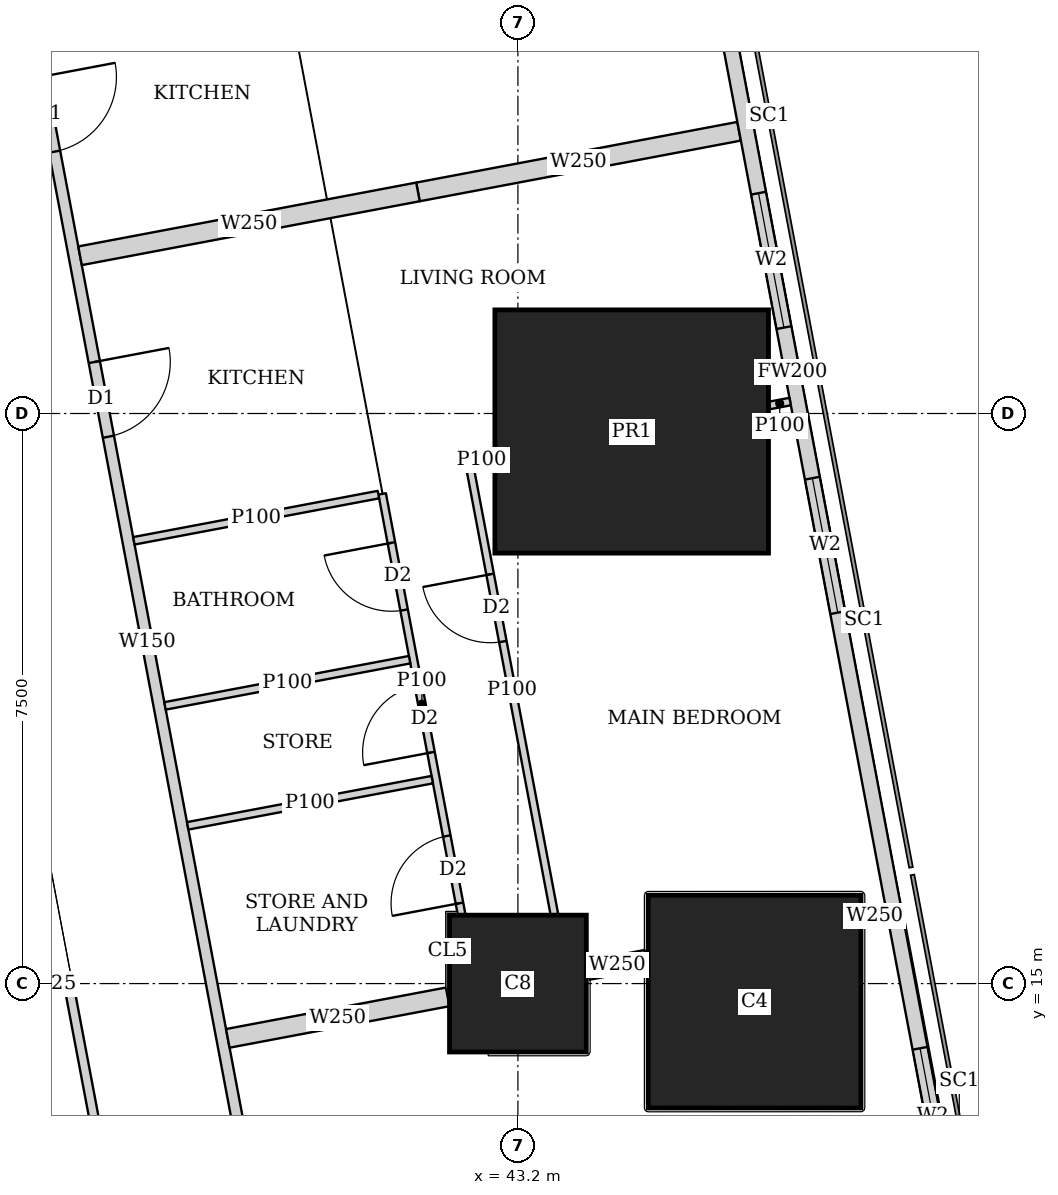
"""IFC4 building model, lengths in metres.
Left out: names, types, materials, properties, quantities, classifications, styles, units other than length and angle.
Written with IfcOpenShell. Run it as: python <this file> out.ifc"""

import sys

from ifc_helpers import new_model, si_unit, direction, frame, frame_2d, origin, origin_2d, place, context, subcontext, project, spatial, rectangle, extrude, element, fill, save


model = new_model("IFC4")
c1 = context("Model", 3, precision=1e-05, world=origin(), true_north=direction((0.0, 1.0)))
c2 = subcontext(c1, "Body", "Model", "MODEL_VIEW")
j1 = project(units=[si_unit("LENGTHUNIT", "METRE"), si_unit("PLANEANGLEUNIT", "RADIAN")], contexts=[c1])
p1 = place(None, origin())
s1 = spatial("IfcSite", under=j1, at=p1, CompositionType="ELEMENT")
p2 = place(p1, origin())
s2 = spatial("IfcBuilding", under=s1, at=p2, CompositionType="ELEMENT")
p3 = place(p2, frame((0.0, 0.0, 53.75)))
s3 = spatial("IfcBuildingStorey", under=s2, at=p3, CompositionType="ELEMENT", Elevation=53.75)
p4 = place(p3, frame((43.2, 15.0, 0.0), z_axis=(0.0, 0.0, 1.0), x_axis=(1.0, 0.0, 0.0)))
e1 = element("IfcColumn", 1, at=p4, inside=s3, PredefinedType="COLUMN", context=c2, shape_type="SweptSolid", body=[
    extrude(rectangle(XDim=1.8, YDim=1.8, at=origin_2d()), origin(), (0.0, 0.0, 1.0), 3.75),
])
p5 = place(p3, frame((46.314, 14.763, 0.0), z_axis=(0.0, 0.0, 1.0), x_axis=(1.0, 0.0, 0.0)))
e2 = element("IfcColumn", 2, at=p5, inside=s3, PredefinedType="COLUMN", context=c2, shape_type="SweptSolid", body=[
    extrude(rectangle(XDim=2.8, YDim=2.8, at=origin_2d()), origin(), (0.0, 0.0, 1.0), 3.75),
])
p6 = place(p3, frame((44.697, 22.263, 0.0), z_axis=(0.0, 0.0, 1.0), x_axis=(1.0, 0.0, 0.0)))
e3 = element("IfcColumn", 3, at=p6, inside=s3, PredefinedType="COLUMN", context=c2, shape_type="SweptSolid", body=[
    extrude(rectangle(XDim=3.6, YDim=3.2, at=origin_2d()), origin(), (0.0, 0.0, 1.0), 3.75),
])
p7 = place(p3, frame((50.653, 2.703, 0.0), z_axis=(0.0, 0.0, 1.0), x_axis=(-0.185612026696, 0.982623109613, 0.0)))
e4 = element("IfcWall", 4, at=p7, inside=s3, PredefinedType="SOLIDWALL", context=c2, shape_type="SweptSolid", body=[
    extrude(rectangle(XDim=41.393, YDim=0.2, at=frame_2d((20.697, 0.0))), origin(), (0.0, 0.0, 1.0), 3.5),
])
p8 = place(p7, frame((1.633, 0.0, 0.9)))
e5 = element("IfcOpeningElement", 5, at=p8, cuts=e4, PredefinedType="OPENING", context=c2, shape_type="SweptSolid", body=[
    extrude(rectangle(XDim=1.8, YDim=1.5, at=frame_2d((0.9, 0.75))), frame((0.0, 0.11, 0.0), z_axis=(0.0, -1.0, 0.0), x_axis=(1.0, 0.0, 0.0)), (0.0, 0.0, 1.0), 0.22),
])
p9 = place(p7, frame((6.032, 0.0, 0.9)))
e6 = element("IfcOpeningElement", 6, at=p9, cuts=e4, PredefinedType="OPENING", context=c2, shape_type="SweptSolid", body=[
    extrude(rectangle(XDim=1.8, YDim=1.5, at=frame_2d((0.9, 0.75))), frame((0.0, 0.11, 0.0), z_axis=(0.0, -1.0, 0.0), x_axis=(1.0, 0.0, 0.0)), (0.0, 0.0, 1.0), 0.22),
])
p10 = place(p7, frame((9.848, 0.0, 0.9)))
e7 = element("IfcOpeningElement", 7, at=p10, cuts=e4, PredefinedType="OPENING", context=c2, shape_type="SweptSolid", body=[
    extrude(rectangle(XDim=1.8, YDim=1.5, at=frame_2d((0.9, 0.75))), frame((0.0, 0.11, 0.0), z_axis=(0.0, -1.0, 0.0), x_axis=(1.0, 0.0, 0.0)), (0.0, 0.0, 1.0), 0.22),
])
p11 = place(p7, frame((17.481, 0.0, 0.9)))
e8 = element("IfcOpeningElement", 8, at=p11, cuts=e4, PredefinedType="OPENING", context=c2, shape_type="SweptSolid", body=[
    extrude(rectangle(XDim=1.8, YDim=1.5, at=frame_2d((0.9, 0.75))), frame((0.0, 0.11, 0.0), z_axis=(0.0, -1.0, 0.0), x_axis=(1.0, 0.0, 0.0)), (0.0, 0.0, 1.0), 0.22),
])
p12 = place(p7, frame((21.297, 0.0, 0.9)))
e9 = element("IfcOpeningElement", 9, at=p12, cuts=e4, PredefinedType="OPENING", context=c2, shape_type="SweptSolid", body=[
    extrude(rectangle(XDim=1.8, YDim=1.5, at=frame_2d((0.9, 0.75))), frame((0.0, 0.11, 0.0), z_axis=(0.0, -1.0, 0.0), x_axis=(1.0, 0.0, 0.0)), (0.0, 0.0, 1.0), 0.22),
])
p13 = place(p7, frame((25.113, 0.0, 0.9)))
e10 = element("IfcOpeningElement", 10, at=p13, cuts=e4, PredefinedType="OPENING", context=c2, shape_type="SweptSolid", body=[
    extrude(rectangle(XDim=1.8, YDim=1.5, at=frame_2d((0.9, 0.75))), frame((0.0, 0.11, 0.0), z_axis=(0.0, -1.0, 0.0), x_axis=(1.0, 0.0, 0.0)), (0.0, 0.0, 1.0), 0.22),
])
p14 = place(p7, frame((28.93, 0.0, 0.9)))
e11 = element("IfcOpeningElement", 11, at=p14, cuts=e4, PredefinedType="OPENING", context=c2, shape_type="SweptSolid", body=[
    extrude(rectangle(XDim=1.8, YDim=1.5, at=frame_2d((0.9, 0.75))), frame((0.0, 0.11, 0.0), z_axis=(0.0, -1.0, 0.0), x_axis=(1.0, 0.0, 0.0)), (0.0, 0.0, 1.0), 0.22),
])
p15 = place(p7, frame((32.746, 0.0, 0.9)))
e12 = element("IfcOpeningElement", 12, at=p15, cuts=e4, PredefinedType="OPENING", context=c2, shape_type="SweptSolid", body=[
    extrude(rectangle(XDim=1.8, YDim=1.5, at=frame_2d((0.9, 0.75))), frame((0.0, 0.11, 0.0), z_axis=(0.0, -1.0, 0.0), x_axis=(1.0, 0.0, 0.0)), (0.0, 0.0, 1.0), 0.22),
])
p16 = place(p7, frame((36.481, 0.0, 0.9)))
e13 = element("IfcOpeningElement", 13, at=p16, cuts=e4, PredefinedType="OPENING", context=c2, shape_type="SweptSolid", body=[
    extrude(rectangle(XDim=1.8, YDim=1.5, at=frame_2d((0.9, 0.75))), frame((0.0, 0.11, 0.0), z_axis=(0.0, -1.0, 0.0), x_axis=(1.0, 0.0, 0.0)), (0.0, 0.0, 1.0), 0.22),
])
p17 = place(p3, frame((35.094, 36.585, 0.0), z_axis=(0.0, 0.0, 1.0), x_axis=(0.185588860311, -0.982627485331, 0.0)))
e14 = element("IfcWall", 14, at=p17, inside=s3, PredefinedType="SOLIDWALL", context=c2, shape_type="SweptSolid", body=[
    extrude(rectangle(XDim=34.797, YDim=0.15, at=frame_2d((17.399, 0.0))), origin(), (0.0, 0.0, 1.0), 2.5),
])
p18 = place(p17, frame((9.828, 0.0, 0.0)))
e15 = element("IfcOpeningElement", 15, at=p18, cuts=e14, PredefinedType="OPENING", context=c2, shape_type="SweptSolid", body=[
    extrude(rectangle(XDim=1.0, YDim=2.1, at=frame_2d((0.5, 1.05))), frame((0.0, 0.085, 0.0), z_axis=(0.0, -1.0, 0.0), x_axis=(1.0, 0.0, 0.0)), (0.0, 0.0, 1.0), 0.17),
])
p19 = place(p17, frame((13.645, 0.0, 0.0)))
e16 = element("IfcOpeningElement", 16, at=p19, cuts=e14, PredefinedType="OPENING", context=c2, shape_type="SweptSolid", body=[
    extrude(rectangle(XDim=1.0, YDim=2.1, at=frame_2d((0.5, 1.05))), frame((0.0, 0.085, 0.0), z_axis=(0.0, -1.0, 0.0), x_axis=(1.0, 0.0, 0.0)), (0.0, 0.0, 1.0), 0.17),
])
p20 = place(p17, frame((25.9, 0.0, 0.0)))
e17 = element("IfcOpeningElement", 17, at=p20, cuts=e14, PredefinedType="OPENING", context=c2, shape_type="SweptSolid", body=[
    extrude(rectangle(XDim=1.0, YDim=2.1, at=frame_2d((0.5, 1.05))), frame((0.0, 0.085, 0.0), z_axis=(0.0, -1.0, 0.0), x_axis=(1.0, 0.0, 0.0)), (0.0, 0.0, 1.0), 0.17),
])
p21 = place(p3, frame((42.565, 21.809, 0.0), z_axis=(0.0, 0.0, 1.0), x_axis=(0.185719768524, -0.982602751665, 0.0)))
e18 = element("IfcWall", 18, at=p21, inside=s3, PredefinedType="PARTITIONING", context=c2, shape_type="SweptSolid", body=[
    extrude(rectangle(XDim=6.004, YDim=0.1, at=frame_2d((3.002, 0.0))), origin(), (0.0, 0.0, 1.0), 2.5),
])
p22 = place(p21, frame((1.45, 0.0, 0.0)))
e19 = element("IfcOpeningElement", 19, at=p22, cuts=e18, PredefinedType="OPENING", context=c2, shape_type="SweptSolid", body=[
    extrude(rectangle(XDim=0.9, YDim=2.1, at=frame_2d((0.45, 1.05))), frame((0.0, 0.06, 0.0), z_axis=(0.0, -1.0, 0.0), x_axis=(1.0, 0.0, 0.0)), (0.0, 0.0, 1.0), 0.12),
])
p23 = place(p3, frame((41.414, 21.442, 0.0), z_axis=(0.0, 0.0, 1.0), x_axis=(0.185605379031, -0.982624365297, 0.0)))
e20 = element("IfcWall", 20, at=p23, inside=s3, PredefinedType="PARTITIONING", context=c2, shape_type="SweptSolid", body=[
    extrude(rectangle(XDim=5.63, YDim=0.1, at=frame_2d((2.815, 0.0))), origin(), (0.0, 0.0, 1.0), 3.5),
])
p24 = place(p23, frame((0.655, 0.0, 0.0)))
e21 = element("IfcOpeningElement", 21, at=p24, cuts=e20, PredefinedType="OPENING", context=c2, shape_type="SweptSolid", body=[
    extrude(rectangle(XDim=0.9, YDim=2.1, at=frame_2d((0.45, 1.05))), frame((0.0, 0.06, 0.0), z_axis=(0.0, -1.0, 0.0), x_axis=(1.0, 0.0, 0.0)), (0.0, 0.0, 1.0), 0.12),
])
p25 = place(p23, frame((4.58, 0.0, 0.0)))
e22 = element("IfcOpeningElement", 22, at=p25, cuts=e20, PredefinedType="OPENING", context=c2, shape_type="SweptSolid", body=[
    extrude(rectangle(XDim=0.9, YDim=2.1, at=frame_2d((0.45, 1.05))), frame((0.0, 0.06, 0.0), z_axis=(0.0, -1.0, 0.0), x_axis=(1.0, 0.0, 0.0)), (0.0, 0.0, 1.0), 0.12),
])
p26 = place(p23, frame((2.562, 0.0, 0.0)))
e23 = element("IfcOpeningElement", 23, at=p26, cuts=e20, PredefinedType="OPENING", context=c2, shape_type="SweptSolid", body=[
    extrude(rectangle(XDim=0.9, YDim=2.1, at=frame_2d((0.45, 1.05))), frame((0.0, 0.06, 0.0), z_axis=(0.0, -1.0, 0.0), x_axis=(1.0, 0.0, 0.0)), (0.0, 0.0, 1.0), 0.12),
])
p27 = place(p3, frame((46.782, 22.657, 0.0), z_axis=(0.0, 0.0, 1.0), x_axis=(-0.982574553168, -0.185868898601, 0.0)))
e24 = element("IfcWall", 24, at=p27, inside=s3, PredefinedType="PARTITIONING", context=c2, shape_type="SweptSolid", body=[
    extrude(rectangle(XDim=0.28, YDim=0.1, at=frame_2d((0.14, 0.0))), origin(), (0.0, 0.0, 1.0), 3.5),
])
p28 = place(p3, frame((42.887, 21.921, 0.0), z_axis=(0.0, 0.0, 1.0), x_axis=(-0.982274918032, -0.187445953293, 0.0)))
e25 = element("IfcWall", 25, at=p28, inside=s3, PredefinedType="PARTITIONING", context=c2, shape_type="SweptSolid", body=[
    extrude(rectangle(XDim=0.336, YDim=0.1, at=frame_2d((0.168, 0.0))), origin(), (0.0, 0.0, 1.0), 2.5),
])
for number, where, z_axis, x_axis in (
    (26, (41.365, 21.433, 0.0), (0.0, 0.0, 1.0), (-0.983, -0.186, 0.0)),
    (27, (42.073, 17.683, 0.0), (0.0, 0.0, 1.0), (-0.983, -0.186, 0.0)),
    (28, (41.775, 19.261, 0.0), (0.0, 0.0, 1.0), (-0.983, -0.186, 0.0)),
):
    element("IfcWall", number, at=place(p3, frame(where, z_axis=z_axis, x_axis=x_axis)), inside=s3, PredefinedType="PARTITIONING", context=c2, shape_type="SweptSolid", body=[
        extrude(rectangle(XDim=3.275, YDim=0.1, at=frame_2d((1.637, 0.0))), origin(), (0.0, 0.0, 1.0), 3.5),
    ])
p29 = place(p3, frame((46.11, 26.213, 0.0), z_axis=(0.0, 0.0, 1.0), x_axis=(-0.982633535512, -0.185556823879, 0.0)))
e29 = element("IfcWall", 29, at=p29, inside=s3, PredefinedType="SOLIDWALL", context=c2, shape_type="SweptSolid", body=[
    extrude(rectangle(XDim=4.3, YDim=0.25, at=frame_2d((2.15, 0.0))), origin(), (0.0, 0.0, 1.0), 2.05),
])
p30 = place(p3, frame((41.885, 25.415, 0.0), z_axis=(0.0, 0.0, 1.0), x_axis=(-0.982612837616, -0.185666398014, 0.0)))
e30 = element("IfcWall", 30, at=p30, inside=s3, PredefinedType="SOLIDWALL", context=c2, shape_type="SweptSolid", body=[
    extrude(rectangle(XDim=4.525, YDim=0.25, at=frame_2d((2.262, 0.0))), origin(), (0.0, 0.0, 1.0), 3.5),
])
p31 = place(p3, frame((48.055, 15.917, 0.0), z_axis=(0.0, 0.0, 1.0), x_axis=(-0.982510408223, -0.186207673669, 0.0)))
e31 = element("IfcWall", 31, at=p31, inside=s3, PredefinedType="SOLIDWALL", context=c2, shape_type="SweptSolid", body=[
    extrude(rectangle(XDim=0.323, YDim=0.25, at=frame_2d((0.161, 0.0))), origin(), (0.0, 0.0, 1.0), 3.5),
])
p32 = place(p3, frame((44.89, 15.319, 0.0), z_axis=(0.0, 0.0, 1.0), x_axis=(-0.982540856152, -0.186046945666, 0.0)))
e32 = element("IfcWall", 32, at=p32, inside=s3, PredefinedType="SOLIDWALL", context=c2, shape_type="SweptSolid", body=[
    extrude(rectangle(XDim=0.78, YDim=0.25, at=frame_2d((0.39, 0.0))), origin(), (0.0, 0.0, 1.0), 2.05),
])
p33 = place(p3, frame((42.276, 14.825, 0.0), z_axis=(0.0, 0.0, 1.0), x_axis=(-0.982656521819, -0.185435056358, 0.0)))
e33 = element("IfcWall", 33, at=p33, inside=s3, PredefinedType="SOLIDWALL", context=c2, shape_type="SweptSolid", body=[
    extrude(rectangle(XDim=2.944, YDim=0.25, at=frame_2d((1.472, 0.0))), origin(), (0.0, 0.0, 1.0), 3.5),
])
p34 = place(p3, frame((38.202, 10.163, 0.0), z_axis=(0.0, 0.0, 1.0), x_axis=(-0.185641892853, 0.982617467593, 0.0)))
e34 = element("IfcWall", 34, at=p34, inside=s3, PredefinedType="PARTITIONING", context=c2, shape_type="SweptSolid", body=[
    extrude(rectangle(XDim=4.922, YDim=0.125, at=frame_2d((2.461, 0.0))), origin(), (0.0, 0.0, 1.0), 3.5),
])
p35 = place(p34, frame((0.708, 0.0, 0.0)))
e35 = element("IfcOpeningElement", 35, at=p35, cuts=e34, PredefinedType="OPENING", context=c2, shape_type="SweptSolid", body=[
    extrude(rectangle(XDim=1.0, YDim=2.1, at=frame_2d((0.5, 1.05))), frame((0.0, 0.073, 0.0), z_axis=(0.0, -1.0, 0.0), x_axis=(1.0, 0.0, 0.0)), (0.0, 0.0, 1.0), 0.145),
])
p36 = place(p3, frame((36.901, 15.0, 0.0), z_axis=(0.0, 0.0, 1.0), x_axis=(1.0, 0.0, 0.0)))
e36 = element("IfcWall", 36, at=p36, inside=s3, PredefinedType="PARTITIONING", context=c2, shape_type="SweptSolid", body=[
    extrude(rectangle(XDim=0.326, YDim=0.125, at=frame_2d((0.163, 0.0))), origin(), (0.0, 0.0, 1.0), 3.5),
])
p37 = place(p10, origin())
e37 = element("IfcWindow", 37, at=p37, inside=s3, PartitioningType="SINGLE_PANEL", PredefinedType="WINDOW", context=c2, shape_type="SweptSolid", body=[
    extrude(rectangle(XDim=1.8, YDim=1.5, at=frame_2d((0.9, 0.75))), frame((0.0, 0.03, 0.0), z_axis=(0.0, -1.0, 0.0), x_axis=(1.0, 0.0, 0.0)), (0.0, 0.0, 1.0), 0.06),
])
fill(e7, e37)
p38 = place(p11, origin())
e38 = element("IfcWindow", 38, at=p38, inside=s3, PartitioningType="SINGLE_PANEL", PredefinedType="WINDOW", context=c2, shape_type="SweptSolid", body=[
    extrude(rectangle(XDim=1.8, YDim=1.5, at=frame_2d((0.9, 0.75))), frame((0.0, 0.03, 0.0), z_axis=(0.0, -1.0, 0.0), x_axis=(1.0, 0.0, 0.0)), (0.0, 0.0, 1.0), 0.06),
])
fill(e8, e38)
p39 = place(p12, origin())
e39 = element("IfcWindow", 39, at=p39, inside=s3, PartitioningType="SINGLE_PANEL", PredefinedType="WINDOW", context=c2, shape_type="SweptSolid", body=[
    extrude(rectangle(XDim=1.8, YDim=1.5, at=frame_2d((0.9, 0.75))), frame((0.0, 0.03, 0.0), z_axis=(0.0, -1.0, 0.0), x_axis=(1.0, 0.0, 0.0)), (0.0, 0.0, 1.0), 0.06),
])
fill(e9, e39)
p40 = place(p18, origin())
e40 = element("IfcDoor", 40, at=p40, inside=s3, OperationType="SINGLE_SWING_LEFT", PredefinedType="DOOR", context=c2, shape_type="SweptSolid", body=[
    extrude(rectangle(XDim=1.0, YDim=2.1, at=frame_2d((0.5, 1.05))), frame((0.0, 0.025, 0.0), z_axis=(0.0, -1.0, 0.0), x_axis=(1.0, 0.0, 0.0)), (0.0, 0.0, 1.0), 0.05),
])
fill(e15, e40)
p41 = place(p22, origin())
e41 = element("IfcDoor", 41, at=p41, inside=s3, OperationType="SINGLE_SWING_RIGHT", PredefinedType="DOOR", context=c2, shape_type="SweptSolid", body=[
    extrude(rectangle(XDim=0.9, YDim=2.1, at=frame_2d((0.45, 1.05))), frame((0.0, 0.025, 0.0), z_axis=(0.0, -1.0, 0.0), x_axis=(1.0, 0.0, 0.0)), (0.0, 0.0, 1.0), 0.05),
])
fill(e19, e41)
p42 = place(p24, origin())
e42 = element("IfcDoor", 42, at=p42, inside=s3, OperationType="SINGLE_SWING_RIGHT", PredefinedType="DOOR", context=c2, shape_type="SweptSolid", body=[
    extrude(rectangle(XDim=0.9, YDim=2.1, at=frame_2d((0.45, 1.05))), frame((0.0, 0.025, 0.0), z_axis=(0.0, -1.0, 0.0), x_axis=(1.0, 0.0, 0.0)), (0.0, 0.0, 1.0), 0.05),
])
fill(e21, e42)
p43 = place(p25, origin())
e43 = element("IfcDoor", 43, at=p43, inside=s3, OperationType="SINGLE_SWING_LEFT", PredefinedType="DOOR", context=c2, shape_type="SweptSolid", body=[
    extrude(rectangle(XDim=0.9, YDim=2.1, at=frame_2d((0.45, 1.05))), frame((0.0, 0.025, 0.0), z_axis=(0.0, -1.0, 0.0), x_axis=(1.0, 0.0, 0.0)), (0.0, 0.0, 1.0), 0.05),
])
fill(e22, e43)
p44 = place(p26, origin())
e44 = element("IfcDoor", 44, at=p44, inside=s3, OperationType="SINGLE_SWING_LEFT", PredefinedType="DOOR", context=c2, shape_type="SweptSolid", body=[
    extrude(rectangle(XDim=0.9, YDim=2.1, at=frame_2d((0.45, 1.05))), frame((0.0, 0.025, 0.0), z_axis=(0.0, -1.0, 0.0), x_axis=(1.0, 0.0, 0.0)), (0.0, 0.0, 1.0), 0.05),
])
fill(e23, e44)
p45 = place(p19, origin())
e45 = element("IfcDoor", 45, at=p45, inside=s3, OperationType="SINGLE_SWING_LEFT", PredefinedType="DOOR", context=c2, shape_type="SweptSolid", body=[
    extrude(rectangle(XDim=1.0, YDim=2.1, at=frame_2d((0.5, 1.05))), frame((0.0, 0.025, 0.0), z_axis=(0.0, -1.0, 0.0), x_axis=(1.0, 0.0, 0.0)), (0.0, 0.0, 1.0), 0.05),
])
fill(e16, e45)
save(model, sys.argv[1])
